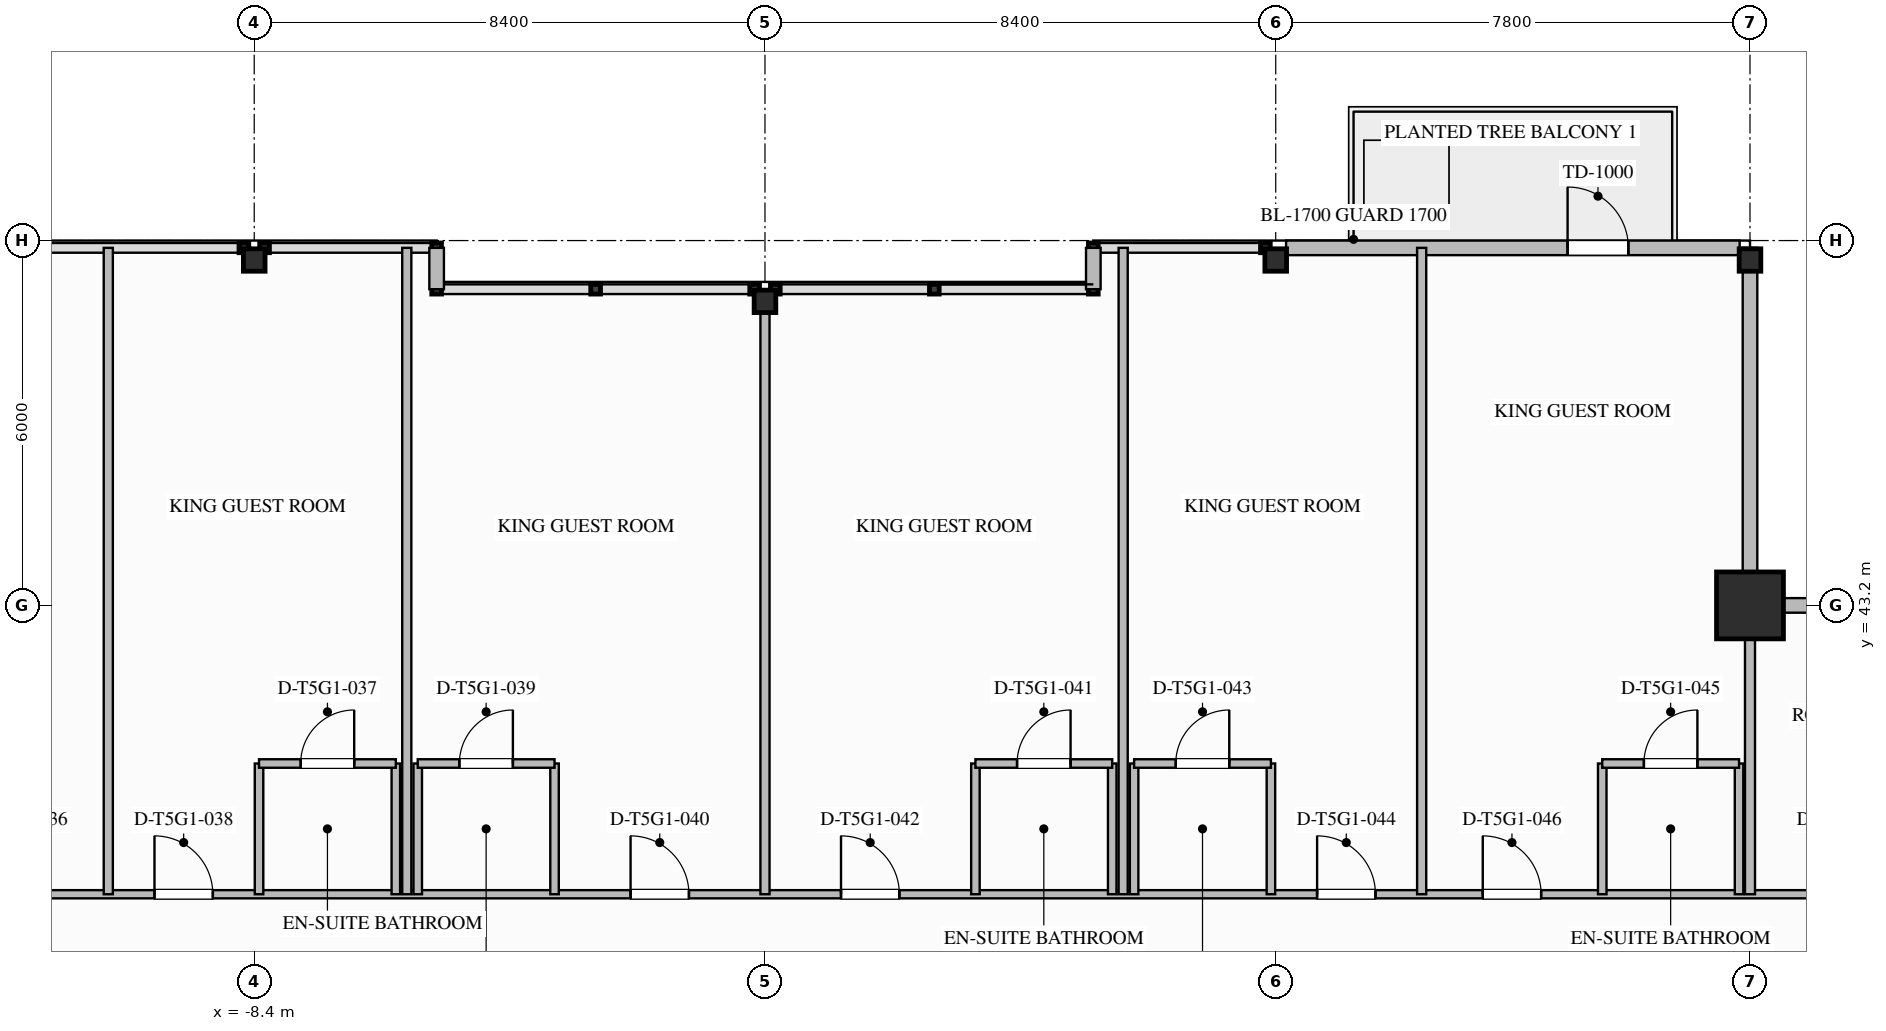
"""IFC4 building model, lengths in metres.
Left out: names, types, materials, properties, quantities, classifications, styles, units other than length and angle.
Written with IfcOpenShell. Run it as: python <this file> out.ifc"""

import sys

from ifc_helpers import new_model, si_unit, direction, frame, frame_2d, origin, origin_2d, place, context, subcontext, project, spatial, rectangle, i_section, extrude, element, fill, save


model = new_model("IFC4")
c1 = context("Model", 3, precision=1e-05, world=origin(), true_north=direction((0.0, 1.0)))
c2 = subcontext(c1, "Body", "Model", "MODEL_VIEW")
j1 = project(units=[si_unit("LENGTHUNIT", "METRE"), si_unit("PLANEANGLEUNIT", "RADIAN")], contexts=[c1])
p1 = place(None, origin())
s1 = spatial("IfcSite", under=j1, at=p1, CompositionType="ELEMENT")
p2 = place(p1, origin())
s2 = spatial("IfcBuilding", under=s1, at=p2, CompositionType="ELEMENT")
p3 = place(p2, frame((0.0, 0.0, 272.3)))
s3 = spatial("IfcBuildingStorey", under=s2, at=p3, CompositionType="ELEMENT", Elevation=272.3)
p4 = place(p3, frame((16.2, 43.2, 0.0), z_axis=(0.0, 0.0, 1.0), x_axis=(1.0, 0.0, 0.0)))
e1 = element("IfcColumn", 1, at=p4, inside=s3, PredefinedType="COLUMN", context=c2, shape_type="SweptSolid", body=[
    extrude(rectangle(XDim=1.1, YDim=1.1, at=origin_2d()), origin(), (0.0, 0.0, 1.0), 3.65),
])
for number, where, z_axis, x_axis in (
    (2, (-8.4, 48.88, 0.0), (0.0, 0.0, 1.0), (0.0, 1.0, 0.0)),
    (3, (0.0, 48.2, 0.0), (0.0, 0.0, 1.0), (0.0, 1.0, 0.0)),
    (4, (8.4, 48.88, 0.0), (0.0, 0.0, 1.0), (0.0, 1.0, 0.0)),
    (5, (16.2, 48.88, 0.0), (0.0, 0.0, 1.0), (0.0, 1.0, 0.0)),
):
    element("IfcColumn", number, at=place(p3, frame(where, z_axis=z_axis, x_axis=x_axis)), inside=s3, PredefinedType="COLUMN", context=c2, shape_type="SweptSolid", body=[
        extrude(i_section(OverallWidth=0.369, OverallDepth=0.356, WebThickness=0.011, FlangeThickness=0.018, FilletRadius=0.025, at=origin_2d()), origin(), (0.0, 0.0, 1.0), 3.647),
    ])
p5 = place(p3, frame((8.57, 49.08, 0.0), z_axis=(0.0, 0.0, 1.0), x_axis=(1.0, 0.0, 0.0)))
e6 = element("IfcWall", 6, at=p5, inside=s3, PredefinedType="STANDARD", context=c2, shape_type="SweptSolid", body=[
    extrude(rectangle(XDim=7.46, YDim=0.24, at=frame_2d((3.73, 0.0))), origin(), (0.0, 0.0, 1.0), 2.853),
])
p6 = place(p5, frame((4.63, 0.0, 0.0)))
e7 = element("IfcOpeningElement", 7, at=p6, cuts=e6, PredefinedType="OPENING", context=c2, shape_type="SweptSolid", body=[
    extrude(rectangle(XDim=1.0, YDim=2.2, at=frame_2d((0.5, 1.1))), frame((0.0, 0.13, 0.0), z_axis=(0.0, -1.0, 0.0), x_axis=(1.0, 0.0, 0.0)), (0.0, 0.0, 1.0), 0.26),
])
for number, where, z_axis, x_axis in (
    (8, (16.2, 49.08, 0.0), (0.0, 0.0, 1.0), (0.0, -1.0, 0.0)),
    (9, (16.2, 43.2, 0.0), (0.0, 0.0, 1.0), (1.0, 0.0, 0.0)),
):
    element("IfcWall", number, at=place(p3, frame(where, z_axis=z_axis, x_axis=x_axis)), inside=s3, PredefinedType="STANDARD", context=c2, shape_type="SweptSolid", body=[
        extrude(rectangle(XDim=5.88, YDim=0.24, at=frame_2d((2.94, 0.0))), origin(), (0.0, 0.0, 1.0), 2.779),
    ])
for number, where, z_axis, x_axis in (
    (10, (-5.4, 49.08, 0.0), (0.0, 0.0, 1.0), (0.0, -1.0, 0.0)),
    (11, (5.4, 48.4, 0.0), (0.0, 0.0, 1.0), (0.0, 1.0, 0.0)),
):
    element("IfcWall", number, at=place(p3, frame(where, z_axis=z_axis, x_axis=x_axis)), inside=s3, PredefinedType="STANDARD", context=c2, shape_type="SweptSolid", body=[
        extrude(rectangle(XDim=0.68, YDim=0.24, at=frame_2d((0.34, 0.0))), origin(), (0.0, 0.0, 1.0), 3.39),
    ])
p7 = place(p3, frame((-16.2, 38.45, 0.0), z_axis=(0.0, 0.0, 1.0), x_axis=(1.0, 0.0, 0.0)))
e12 = element("IfcWall", 12, at=p7, inside=s3, PredefinedType="PARTITIONING", context=c2, shape_type="SweptSolid", body=[
    extrude(rectangle(XDim=38.28, YDim=0.135, at=frame_2d((19.14, 0.0))), origin(), (0.0, 0.0, 1.0), 3.39),
])
p8 = place(p7, frame((33.355, 0.0, 0.0)))
e13 = element("IfcOpeningElement", 13, at=p8, cuts=e12, PredefinedType="OPENING", context=c2, shape_type="SweptSolid", body=[
    extrude(rectangle(XDim=1.26, YDim=2.2, at=frame_2d((0.63, 1.1))), frame((0.0, 0.077, 0.0), z_axis=(0.0, -1.0, 0.0), x_axis=(1.0, 0.0, 0.0)), (0.0, 0.0, 1.0), 0.155),
])
p9 = place(p7, frame((3.435, 0.0, 0.0)))
e14 = element("IfcOpeningElement", 14, at=p9, cuts=e12, PredefinedType="OPENING", context=c2, shape_type="SweptSolid", body=[
    extrude(rectangle(XDim=0.96, YDim=2.15, at=frame_2d((0.48, 1.075))), frame((0.0, 0.077, 0.0), z_axis=(0.0, -1.0, 0.0), x_axis=(1.0, 0.0, 0.0)), (0.0, 0.0, 1.0), 0.155),
])
p10 = place(p7, frame((6.16, 0.0, 0.0)))
e15 = element("IfcOpeningElement", 15, at=p10, cuts=e12, PredefinedType="OPENING", context=c2, shape_type="SweptSolid", body=[
    extrude(rectangle(XDim=0.96, YDim=2.15, at=frame_2d((0.48, 1.075))), frame((0.0, 0.077, 0.0), z_axis=(0.0, -1.0, 0.0), x_axis=(1.0, 0.0, 0.0)), (0.0, 0.0, 1.0), 0.155),
])
p11 = place(p7, frame((13.99, 0.0, 0.0)))
e16 = element("IfcOpeningElement", 16, at=p11, cuts=e12, PredefinedType="OPENING", context=c2, shape_type="SweptSolid", body=[
    extrude(rectangle(XDim=0.96, YDim=2.15, at=frame_2d((0.48, 1.075))), frame((0.0, 0.077, 0.0), z_axis=(0.0, -1.0, 0.0), x_axis=(1.0, 0.0, 0.0)), (0.0, 0.0, 1.0), 0.155),
])
p12 = place(p7, frame((17.45, 0.0, 0.0)))
e17 = element("IfcOpeningElement", 17, at=p12, cuts=e12, PredefinedType="OPENING", context=c2, shape_type="SweptSolid", body=[
    extrude(rectangle(XDim=0.96, YDim=2.15, at=frame_2d((0.48, 1.075))), frame((0.0, 0.077, 0.0), z_axis=(0.0, -1.0, 0.0), x_axis=(1.0, 0.0, 0.0)), (0.0, 0.0, 1.0), 0.155),
])
p13 = place(p7, frame((25.281, 0.0, 0.0)))
e18 = element("IfcOpeningElement", 18, at=p13, cuts=e12, PredefinedType="OPENING", context=c2, shape_type="SweptSolid", body=[
    extrude(rectangle(XDim=0.96, YDim=2.15, at=frame_2d((0.48, 1.075))), frame((0.0, 0.077, 0.0), z_axis=(0.0, -1.0, 0.0), x_axis=(1.0, 0.0, 0.0)), (0.0, 0.0, 1.0), 0.155),
])
p14 = place(p7, frame((28.005, 0.0, 0.0)))
e19 = element("IfcOpeningElement", 19, at=p14, cuts=e12, PredefinedType="OPENING", context=c2, shape_type="SweptSolid", body=[
    extrude(rectangle(XDim=0.96, YDim=2.15, at=frame_2d((0.48, 1.075))), frame((0.0, 0.077, 0.0), z_axis=(0.0, -1.0, 0.0), x_axis=(1.0, 0.0, 0.0)), (0.0, 0.0, 1.0), 0.155),
])
p15 = place(p3, frame((16.2, 38.45, 0.0), z_axis=(0.0, 0.0, 1.0), x_axis=(0.0, 1.0, 0.0)))
e20 = element("IfcWall", 20, at=p15, inside=s3, PredefinedType="PARTITIONING", context=c2, shape_type="SweptSolid", body=[
    extrude(rectangle(XDim=4.63, YDim=0.165, at=frame_2d((2.315, 0.0))), origin(), (0.0, 0.0, 1.0), 2.764),
])
p16 = place(p3, frame((-10.8, 38.45, 0.0), z_axis=(0.0, 0.0, 1.0), x_axis=(0.0, 1.0, 0.0)))
e21 = element("IfcWall", 21, at=p16, inside=s3, PredefinedType="PARTITIONING", context=c2, shape_type="SweptSolid", body=[
    extrude(rectangle(XDim=10.63, YDim=0.15, at=frame_2d((5.315, 0.0))), origin(), (0.0, 0.0, 1.0), 3.39),
])
p17 = place(p3, frame((-8.321, 38.45, 0.0), z_axis=(0.0, 0.0, 1.0), x_axis=(0.0, 1.0, 0.0)))
e22 = element("IfcWall", 22, at=p17, inside=s3, PredefinedType="PLUMBINGWALL", context=c2, shape_type="SweptSolid", body=[
    extrude(rectangle(XDim=2.15, YDim=0.14, at=frame_2d((1.075, 0.0))), origin(), (0.0, 0.0, 1.0), 2.767),
])
p18 = place(p3, frame((-6.071, 38.45, 0.0), z_axis=(0.0, 0.0, 1.0), x_axis=(0.0, 1.0, 0.0)))
e23 = element("IfcWall", 23, at=p18, inside=s3, PredefinedType="PLUMBINGWALL", context=c2, shape_type="SweptSolid", body=[
    extrude(rectangle(XDim=2.15, YDim=0.14, at=frame_2d((1.075, 0.0))), origin(), (0.0, 0.0, 1.0), 3.39),
])
p19 = place(p3, frame((-8.321, 40.6, 0.0), z_axis=(0.0, 0.0, 1.0), x_axis=(1.0, 0.0, 0.0)))
e24 = element("IfcWall", 24, at=p19, inside=s3, PredefinedType="PLUMBINGWALL", context=c2, shape_type="SweptSolid", body=[
    extrude(rectangle(XDim=2.25, YDim=0.14, at=frame_2d((1.125, 0.0))), origin(), (0.0, 0.0, 1.0), 3.39),
])
p20 = place(p19, frame((0.685, 0.0, 0.0)))
e25 = element("IfcOpeningElement", 25, at=p20, cuts=e24, PredefinedType="OPENING", context=c2, shape_type="SweptSolid", body=[
    extrude(rectangle(XDim=0.88, YDim=2.1, at=frame_2d((0.44, 1.05))), frame((0.0, 0.08, 0.0), z_axis=(0.0, -1.0, 0.0), x_axis=(1.0, 0.0, 0.0)), (0.0, 0.0, 1.0), 0.16),
])
p21 = place(p3, frame((-5.891, 38.45, 0.0), z_axis=(0.0, 0.0, 1.0), x_axis=(0.0, 1.0, 0.0)))
e26 = element("IfcWall", 26, at=p21, inside=s3, PredefinedType="PARTITIONING", context=c2, shape_type="SweptSolid", body=[
    extrude(rectangle(XDim=10.63, YDim=0.15, at=frame_2d((5.315, 0.0))), origin(), (0.0, 0.0, 1.0), 3.39),
])
for number, where, z_axis, x_axis in (
    (27, (-5.711, 38.45, 0.0), (0.0, 0.0, 1.0), (0.0, 1.0, 0.0)),
    (28, (-3.461, 38.45, 0.0), (0.0, 0.0, 1.0), (0.0, 1.0, 0.0)),
):
    element("IfcWall", number, at=place(p3, frame(where, z_axis=z_axis, x_axis=x_axis)), inside=s3, PredefinedType="PLUMBINGWALL", context=c2, shape_type="SweptSolid", body=[
        extrude(rectangle(XDim=2.15, YDim=0.14, at=frame_2d((1.075, 0.0))), origin(), (0.0, 0.0, 1.0), 3.39),
    ])
p22 = place(p3, frame((-5.711, 40.6, 0.0), z_axis=(0.0, 0.0, 1.0), x_axis=(1.0, 0.0, 0.0)))
e29 = element("IfcWall", 29, at=p22, inside=s3, PredefinedType="PLUMBINGWALL", context=c2, shape_type="SweptSolid", body=[
    extrude(rectangle(XDim=2.25, YDim=0.14, at=frame_2d((1.125, 0.0))), origin(), (0.0, 0.0, 1.0), 3.39),
])
p23 = place(p22, frame((0.685, 0.0, 0.0)))
e30 = element("IfcOpeningElement", 30, at=p23, cuts=e29, PredefinedType="OPENING", context=c2, shape_type="SweptSolid", body=[
    extrude(rectangle(XDim=0.88, YDim=2.1, at=frame_2d((0.44, 1.05))), frame((0.0, 0.08, 0.0), z_axis=(0.0, -1.0, 0.0), x_axis=(1.0, 0.0, 0.0)), (0.0, 0.0, 1.0), 0.16),
])
p24 = place(p3, frame((0.0, 38.45, 0.0), z_axis=(0.0, 0.0, 1.0), x_axis=(0.0, 1.0, 0.0)))
e31 = element("IfcWall", 31, at=p24, inside=s3, PredefinedType="PARTITIONING", context=c2, shape_type="SweptSolid", body=[
    extrude(rectangle(XDim=9.95, YDim=0.15, at=frame_2d((4.975, 0.0))), origin(), (0.0, 0.0, 1.0), 2.767),
])
for number, where, z_axis, x_axis in (
    (32, (3.461, 38.45, 0.0), (0.0, 0.0, 1.0), (0.0, 1.0, 0.0)),
    (33, (5.711, 38.45, 0.0), (0.0, 0.0, 1.0), (0.0, 1.0, 0.0)),
):
    element("IfcWall", number, at=place(p3, frame(where, z_axis=z_axis, x_axis=x_axis)), inside=s3, PredefinedType="PLUMBINGWALL", context=c2, shape_type="SweptSolid", body=[
        extrude(rectangle(XDim=2.15, YDim=0.14, at=frame_2d((1.075, 0.0))), origin(), (0.0, 0.0, 1.0), 3.39),
    ])
p25 = place(p3, frame((3.461, 40.6, 0.0), z_axis=(0.0, 0.0, 1.0), x_axis=(1.0, 0.0, 0.0)))
e34 = element("IfcWall", 34, at=p25, inside=s3, PredefinedType="PLUMBINGWALL", context=c2, shape_type="SweptSolid", body=[
    extrude(rectangle(XDim=2.25, YDim=0.14, at=frame_2d((1.125, 0.0))), origin(), (0.0, 0.0, 1.0), 3.39),
])
p26 = place(p25, frame((0.685, 0.0, 0.0)))
e35 = element("IfcOpeningElement", 35, at=p26, cuts=e34, PredefinedType="OPENING", context=c2, shape_type="SweptSolid", body=[
    extrude(rectangle(XDim=0.88, YDim=2.1, at=frame_2d((0.44, 1.05))), frame((0.0, 0.08, 0.0), z_axis=(0.0, -1.0, 0.0), x_axis=(1.0, 0.0, 0.0)), (0.0, 0.0, 1.0), 0.16),
])
p27 = place(p3, frame((5.891, 38.45, 0.0), z_axis=(0.0, 0.0, 1.0), x_axis=(0.0, 1.0, 0.0)))
e36 = element("IfcWall", 36, at=p27, inside=s3, PredefinedType="PARTITIONING", context=c2, shape_type="SweptSolid", body=[
    extrude(rectangle(XDim=10.63, YDim=0.15, at=frame_2d((5.315, 0.0))), origin(), (0.0, 0.0, 1.0), 3.39),
])
p28 = place(p3, frame((6.071, 38.45, 0.0), z_axis=(0.0, 0.0, 1.0), x_axis=(0.0, 1.0, 0.0)))
e37 = element("IfcWall", 37, at=p28, inside=s3, PredefinedType="PLUMBINGWALL", context=c2, shape_type="SweptSolid", body=[
    extrude(rectangle(XDim=2.15, YDim=0.14, at=frame_2d((1.075, 0.0))), origin(), (0.0, 0.0, 1.0), 3.39),
])
p29 = place(p3, frame((8.321, 38.45, 0.0), z_axis=(0.0, 0.0, 1.0), x_axis=(0.0, 1.0, 0.0)))
e38 = element("IfcWall", 38, at=p29, inside=s3, PredefinedType="PLUMBINGWALL", context=c2, shape_type="SweptSolid", body=[
    extrude(rectangle(XDim=2.15, YDim=0.14, at=frame_2d((1.075, 0.0))), origin(), (0.0, 0.0, 1.0), 2.767),
])
p30 = place(p3, frame((6.071, 40.6, 0.0), z_axis=(0.0, 0.0, 1.0), x_axis=(1.0, 0.0, 0.0)))
e39 = element("IfcWall", 39, at=p30, inside=s3, PredefinedType="PLUMBINGWALL", context=c2, shape_type="SweptSolid", body=[
    extrude(rectangle(XDim=2.25, YDim=0.14, at=frame_2d((1.125, 0.0))), origin(), (0.0, 0.0, 1.0), 3.39),
])
p31 = place(p30, frame((0.685, 0.0, 0.0)))
e40 = element("IfcOpeningElement", 40, at=p31, cuts=e39, PredefinedType="OPENING", context=c2, shape_type="SweptSolid", body=[
    extrude(rectangle(XDim=0.88, YDim=2.1, at=frame_2d((0.44, 1.05))), frame((0.0, 0.08, 0.0), z_axis=(0.0, -1.0, 0.0), x_axis=(1.0, 0.0, 0.0)), (0.0, 0.0, 1.0), 0.16),
])
p32 = place(p3, frame((10.8, 38.45, 0.0), z_axis=(0.0, 0.0, 1.0), x_axis=(0.0, 1.0, 0.0)))
e41 = element("IfcWall", 41, at=p32, inside=s3, PredefinedType="PARTITIONING", context=c2, shape_type="SweptSolid", body=[
    extrude(rectangle(XDim=10.63, YDim=0.15, at=frame_2d((5.315, 0.0))), origin(), (0.0, 0.0, 1.0), 3.39),
])
p33 = place(p3, frame((13.77, 38.45, 0.0), z_axis=(0.0, 0.0, 1.0), x_axis=(0.0, 1.0, 0.0)))
e42 = element("IfcWall", 42, at=p33, inside=s3, PredefinedType="PLUMBINGWALL", context=c2, shape_type="SweptSolid", body=[
    extrude(rectangle(XDim=2.15, YDim=0.14, at=frame_2d((1.075, 0.0))), origin(), (0.0, 0.0, 1.0), 3.39),
])
p34 = place(p3, frame((16.02, 38.45, 0.0), z_axis=(0.0, 0.0, 1.0), x_axis=(0.0, 1.0, 0.0)))
e43 = element("IfcWall", 43, at=p34, inside=s3, PredefinedType="PLUMBINGWALL", context=c2, shape_type="SweptSolid", body=[
    extrude(rectangle(XDim=2.15, YDim=0.14, at=frame_2d((1.075, 0.0))), origin(), (0.0, 0.0, 1.0), 2.764),
])
p35 = place(p3, frame((13.77, 40.6, 0.0), z_axis=(0.0, 0.0, 1.0), x_axis=(1.0, 0.0, 0.0)))
e44 = element("IfcWall", 44, at=p35, inside=s3, PredefinedType="PLUMBINGWALL", context=c2, shape_type="SweptSolid", body=[
    extrude(rectangle(XDim=2.25, YDim=0.14, at=frame_2d((1.125, 0.0))), origin(), (0.0, 0.0, 1.0), 3.39),
])
p36 = place(p35, frame((0.685, 0.0, 0.0)))
e45 = element("IfcOpeningElement", 45, at=p36, cuts=e44, PredefinedType="OPENING", context=c2, shape_type="SweptSolid", body=[
    extrude(rectangle(XDim=0.88, YDim=2.1, at=frame_2d((0.44, 1.05))), frame((0.0, 0.08, 0.0), z_axis=(0.0, -1.0, 0.0), x_axis=(1.0, 0.0, 0.0)), (0.0, 0.0, 1.0), 0.16),
])
p37 = place(p6, origin())
e46 = element("IfcDoor", 46, at=p37, inside=s3, OperationType="SINGLE_SWING_LEFT", PredefinedType="DOOR", context=c2, shape_type="SweptSolid", body=[
    extrude(rectangle(XDim=1.0, YDim=2.2, at=frame_2d((0.5, 1.1))), frame((0.0, 0.025, 0.0), z_axis=(0.0, -1.0, 0.0), x_axis=(1.0, 0.0, 0.0)), (0.0, 0.0, 1.0), 0.05),
])
fill(e7, e46)
p38 = place(p20, origin())
e47 = element("IfcDoor", 47, at=p38, inside=s3, OperationType="SINGLE_SWING_RIGHT", PredefinedType="DOOR", context=c2, shape_type="SweptSolid", body=[
    extrude(rectangle(XDim=0.88, YDim=2.1, at=frame_2d((0.44, 1.05))), frame((0.0, 0.025, 0.0), z_axis=(0.0, -1.0, 0.0), x_axis=(1.0, 0.0, 0.0)), (0.0, 0.0, 1.0), 0.05),
])
fill(e25, e47)
p39 = place(p10, origin())
e48 = element("IfcDoor", 48, at=p39, inside=s3, OperationType="SINGLE_SWING_LEFT", PredefinedType="DOOR", context=c2, shape_type="SweptSolid", body=[
    extrude(rectangle(XDim=0.96, YDim=2.15, at=frame_2d((0.48, 1.075))), frame((0.0, 0.025, 0.0), z_axis=(0.0, -1.0, 0.0), x_axis=(1.0, 0.0, 0.0)), (0.0, 0.0, 1.0), 0.05),
])
fill(e15, e48)
p40 = place(p23, origin())
e49 = element("IfcDoor", 49, at=p40, inside=s3, OperationType="SINGLE_SWING_RIGHT", PredefinedType="DOOR", context=c2, shape_type="SweptSolid", body=[
    extrude(rectangle(XDim=0.88, YDim=2.1, at=frame_2d((0.44, 1.05))), frame((0.0, 0.025, 0.0), z_axis=(0.0, -1.0, 0.0), x_axis=(1.0, 0.0, 0.0)), (0.0, 0.0, 1.0), 0.05),
])
fill(e30, e49)
p41 = place(p11, origin())
e50 = element("IfcDoor", 50, at=p41, inside=s3, OperationType="SINGLE_SWING_LEFT", PredefinedType="DOOR", context=c2, shape_type="SweptSolid", body=[
    extrude(rectangle(XDim=0.96, YDim=2.15, at=frame_2d((0.48, 1.075))), frame((0.0, 0.025, 0.0), z_axis=(0.0, -1.0, 0.0), x_axis=(1.0, 0.0, 0.0)), (0.0, 0.0, 1.0), 0.05),
])
fill(e16, e50)
p42 = place(p26, origin())
e51 = element("IfcDoor", 51, at=p42, inside=s3, OperationType="SINGLE_SWING_RIGHT", PredefinedType="DOOR", context=c2, shape_type="SweptSolid", body=[
    extrude(rectangle(XDim=0.88, YDim=2.1, at=frame_2d((0.44, 1.05))), frame((0.0, 0.025, 0.0), z_axis=(0.0, -1.0, 0.0), x_axis=(1.0, 0.0, 0.0)), (0.0, 0.0, 1.0), 0.05),
])
fill(e35, e51)
p43 = place(p12, origin())
e52 = element("IfcDoor", 52, at=p43, inside=s3, OperationType="SINGLE_SWING_LEFT", PredefinedType="DOOR", context=c2, shape_type="SweptSolid", body=[
    extrude(rectangle(XDim=0.96, YDim=2.15, at=frame_2d((0.48, 1.075))), frame((0.0, 0.025, 0.0), z_axis=(0.0, -1.0, 0.0), x_axis=(1.0, 0.0, 0.0)), (0.0, 0.0, 1.0), 0.05),
])
fill(e17, e52)
p44 = place(p31, origin())
e53 = element("IfcDoor", 53, at=p44, inside=s3, OperationType="SINGLE_SWING_RIGHT", PredefinedType="DOOR", context=c2, shape_type="SweptSolid", body=[
    extrude(rectangle(XDim=0.88, YDim=2.1, at=frame_2d((0.44, 1.05))), frame((0.0, 0.025, 0.0), z_axis=(0.0, -1.0, 0.0), x_axis=(1.0, 0.0, 0.0)), (0.0, 0.0, 1.0), 0.05),
])
fill(e40, e53)
p45 = place(p13, origin())
e54 = element("IfcDoor", 54, at=p45, inside=s3, OperationType="SINGLE_SWING_LEFT", PredefinedType="DOOR", context=c2, shape_type="SweptSolid", body=[
    extrude(rectangle(XDim=0.96, YDim=2.15, at=frame_2d((0.48, 1.075))), frame((0.0, 0.025, 0.0), z_axis=(0.0, -1.0, 0.0), x_axis=(1.0, 0.0, 0.0)), (0.0, 0.0, 1.0), 0.05),
])
fill(e18, e54)
p46 = place(p36, origin())
e55 = element("IfcDoor", 55, at=p46, inside=s3, OperationType="SINGLE_SWING_RIGHT", PredefinedType="DOOR", context=c2, shape_type="SweptSolid", body=[
    extrude(rectangle(XDim=0.88, YDim=2.1, at=frame_2d((0.44, 1.05))), frame((0.0, 0.025, 0.0), z_axis=(0.0, -1.0, 0.0), x_axis=(1.0, 0.0, 0.0)), (0.0, 0.0, 1.0), 0.05),
])
fill(e45, e55)
p47 = place(p14, origin())
e56 = element("IfcDoor", 56, at=p47, inside=s3, OperationType="SINGLE_SWING_LEFT", PredefinedType="DOOR", context=c2, shape_type="SweptSolid", body=[
    extrude(rectangle(XDim=0.96, YDim=2.15, at=frame_2d((0.48, 1.075))), frame((0.0, 0.025, 0.0), z_axis=(0.0, -1.0, 0.0), x_axis=(1.0, 0.0, 0.0)), (0.0, 0.0, 1.0), 0.05),
])
fill(e19, e56)
save(model, sys.argv[1])
